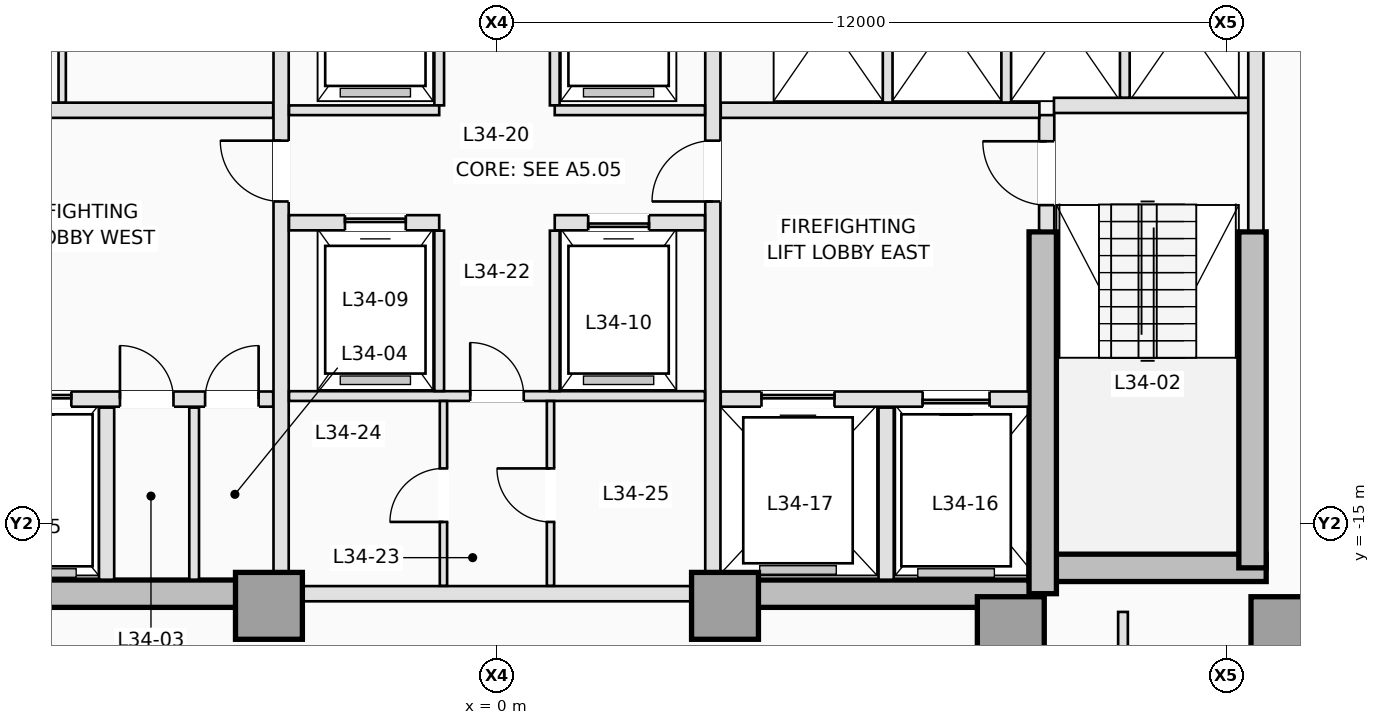
"""IFC4 building model, lengths in metres.
Left out: names, types, materials, properties, quantities, classifications, styles, units other than length and angle.
Written with IfcOpenShell. Run it as: python <this file> out.ifc"""

import sys

from ifc_helpers import new_model, si_unit, direction, frame, frame_2d, origin, origin_2d, place, context, subcontext, project, spatial, rectangle, extrude, element, fill, save


model = new_model("IFC4")
c1 = context("Model", 3, precision=1e-05, world=origin(), true_north=direction((0.0, 1.0)))
c2 = subcontext(c1, "Body", "Model", "MODEL_VIEW")
j1 = project(units=[si_unit("LENGTHUNIT", "METRE"), si_unit("PLANEANGLEUNIT", "RADIAN")], contexts=[c1])
p1 = place(None, origin())
s1 = spatial("IfcSite", under=j1, at=p1, CompositionType="ELEMENT")
p2 = place(p1, origin())
s2 = spatial("IfcBuilding", under=s1, at=p2, CompositionType="ELEMENT")
p3 = place(p2, frame((0.0, 0.0, 126.5)))
s3 = spatial("IfcBuildingStorey", under=s2, at=p3, CompositionType="ELEMENT", Elevation=126.5)
for number, where, z_axis, x_axis in (
    (1, (-8.975, -16.15, 0.0), (0.0, 0.0, 1.0), (1.0, 0.0, 0.0)),
    (2, (3.75, -16.15, 0.0), (0.0, 0.0, 1.0), (1.0, 0.0, 0.0)),
):
    element("IfcWall", number, at=place(p3, frame(where, z_axis=z_axis, x_axis=x_axis)), inside=s3, PredefinedType="SHEAR", context=c2, shape_type="SweptSolid", body=[
        extrude(rectangle(XDim=5.225, YDim=0.45, at=frame_2d((2.613, 0.0))), origin(), (0.0, 0.0, 1.0), 3.5),
    ])
p4 = place(p3, frame((8.75, -15.725, 0.0), z_axis=(0.0, 0.0, 1.0), x_axis=(1.0, 0.0, 0.0)))
e3 = element("IfcWall", 3, at=p4, inside=s3, PredefinedType="SHEAR", context=c2, shape_type="SweptSolid", body=[
    extrude(rectangle(XDim=3.9, YDim=0.45, at=frame_2d((1.95, 0.0))), origin(), (0.0, 0.0, 1.0), 3.5),
])
p5 = place(p3, frame((12.425, -15.725, 0.0), z_axis=(0.0, 0.0, 1.0), x_axis=(0.0, 1.0, 0.0)))
e4 = element("IfcWall", 4, at=p5, inside=s3, PredefinedType="SHEAR", context=c2, shape_type="SweptSolid", body=[
    extrude(rectangle(XDim=5.525, YDim=0.45, at=frame_2d((2.763, 0.0))), origin(), (0.0, 0.0, 1.0), 3.5),
])
p6 = place(p3, frame((8.975, -16.15, 0.0), z_axis=(0.0, 0.0, 1.0), x_axis=(0.0, 1.0, 0.0)))
e5 = element("IfcWall", 5, at=p6, inside=s3, PredefinedType="SHEAR", context=c2, shape_type="SweptSolid", body=[
    extrude(rectangle(XDim=5.95, YDim=0.45, at=frame_2d((2.975, 0.0))), origin(), (0.0, 0.0, 1.0), 3.5),
])
for number, where, z_axis, x_axis in (
    (6, (-3.75, -16.35, 0.0), (0.0, 0.0, 1.0), (1.0, 0.0, 0.0)),
    (7, (3.75, -16.35, 0.0), (0.0, 0.0, 1.0), (1.0, 0.0, 0.0)),
    (8, (8.45, -16.75, 0.0), (0.0, 0.0, 1.0), (1.0, 0.0, 0.0)),
    (9, (12.95, -16.75, 0.0), (0.0, 0.0, 1.0), (1.0, 0.0, 0.0)),
):
    element("IfcColumn", number, at=place(p3, frame(where, z_axis=z_axis, x_axis=x_axis)), inside=s3, PredefinedType="COLUMN", context=c2, shape_type="SweptSolid", body=[
        extrude(rectangle(XDim=1.1, YDim=1.1, at=origin_2d()), origin(), (0.0, 0.0, 1.0), 3.5),
    ])
p7 = place(p3, frame((9.04, -10.18, 0.0), z_axis=(0.0, 0.0, 1.0), x_axis=(0.0, 1.0, 0.0)))
e10 = element("IfcWall", 10, at=p7, inside=s3, PredefinedType="PARTITIONING", context=c2, shape_type="SweptSolid", body=[
    extrude(rectangle(XDim=1.9, YDim=0.25, at=frame_2d((0.95, 0.0))), origin(), (0.0, 0.0, 1.0), 3.25),
])
p8 = place(p7, frame((0.42, 0.0, 0.0)))
e11 = element("IfcOpeningElement", 11, at=p8, cuts=e10, PredefinedType="OPENING", context=c2, shape_type="SweptSolid", body=[
    extrude(rectangle(XDim=1.05, YDim=2.15, at=frame_2d((0.525, 1.075))), frame((0.0, 0.135, 0.0), z_axis=(0.0, -1.0, 0.0), x_axis=(1.0, 0.0, 0.0)), (0.0, 0.0, 1.0), 0.27),
])
p9 = place(p3, frame((9.16, -8.12, 0.0), z_axis=(0.0, 0.0, 1.0), x_axis=(1.0, 0.0, 0.0)))
e12 = element("IfcWall", 12, at=p9, inside=s3, PredefinedType="PARTITIONING", context=c2, shape_type="SweptSolid", body=[
    extrude(rectangle(XDim=3.22, YDim=0.25, at=frame_2d((1.61, 0.0))), origin(), (0.0, 0.0, 1.0), 3.25),
])
p10 = place(p3, frame((12.48, -10.18, 0.0), z_axis=(0.0, 0.0, 1.0), x_axis=(0.0, 1.0, 0.0)))
e13 = element("IfcWall", 13, at=p10, inside=s3, PredefinedType="PARTITIONING", context=c2, shape_type="SweptSolid", body=[
    extrude(rectangle(XDim=4.828, YDim=0.25, at=frame_2d((2.414, 0.0))), origin(), (0.0, 0.0, 1.0), 3.25),
])
p11 = place(p3, frame((-8.748, -12.95, 0.0), z_axis=(0.0, 0.0, 1.0), x_axis=(1.0, 0.0, 0.0)))
e14 = element("IfcWall", 14, at=p11, inside=s3, PredefinedType="PARTITIONING", context=c2, shape_type="SweptSolid", body=[
    extrude(rectangle(XDim=5.068, YDim=0.25, at=frame_2d((2.534, 0.0))), origin(), (0.0, 0.0, 1.0), 3.25),
])
p12 = place(p11, frame((0.648, 0.0, 0.0)))
e15 = element("IfcOpeningElement", 15, at=p12, cuts=e14, PredefinedType="OPENING", context=c2, shape_type="SweptSolid", body=[
    extrude(rectangle(XDim=1.1, YDim=2.15, at=frame_2d((0.55, 1.075))), frame((0.0, 0.135, 0.0), z_axis=(0.0, -1.0, 0.0), x_axis=(1.0, 0.0, 0.0)), (0.0, 0.0, 1.0), 0.27),
])
p13 = place(p11, frame((2.548, 0.0, 0.0)))
e16 = element("IfcOpeningElement", 16, at=p13, cuts=e14, PredefinedType="OPENING", context=c2, shape_type="SweptSolid", body=[
    extrude(rectangle(XDim=0.88, YDim=2.1, at=frame_2d((0.44, 1.05))), frame((0.0, 0.135, 0.0), z_axis=(0.0, -1.0, 0.0), x_axis=(1.0, 0.0, 0.0)), (0.0, 0.0, 1.0), 0.27),
])
p14 = place(p11, frame((3.948, 0.0, 0.0)))
e17 = element("IfcOpeningElement", 17, at=p14, cuts=e14, PredefinedType="OPENING", context=c2, shape_type="SweptSolid", body=[
    extrude(rectangle(XDim=0.88, YDim=2.1, at=frame_2d((0.44, 1.05))), frame((0.0, 0.135, 0.0), z_axis=(0.0, -1.0, 0.0), x_axis=(1.0, 0.0, 0.0)), (0.0, 0.0, 1.0), 0.27),
])
p15 = place(p3, frame((3.68, -12.95, 0.0), z_axis=(0.0, 0.0, 1.0), x_axis=(1.0, 0.0, 0.0)))
e18 = element("IfcWall", 18, at=p15, inside=s3, PredefinedType="PARTITIONING", context=c2, shape_type="SweptSolid", body=[
    extrude(rectangle(XDim=5.068, YDim=0.25, at=frame_2d((2.534, 0.0))), origin(), (0.0, 0.0, 1.0), 3.25),
])
p16 = place(p15, frame((3.32, 0.0, 0.0)))
e19 = element("IfcOpeningElement", 19, at=p16, cuts=e18, PredefinedType="OPENING", context=c2, shape_type="SweptSolid", body=[
    extrude(rectangle(XDim=1.1, YDim=2.15, at=frame_2d((0.55, 1.075))), frame((0.0, 0.135, 0.0), z_axis=(0.0, -1.0, 0.0), x_axis=(1.0, 0.0, 0.0)), (0.0, 0.0, 1.0), 0.27),
])
p17 = place(p15, frame((0.67, 0.0, 0.0)))
e20 = element("IfcOpeningElement", 20, at=p17, cuts=e18, PredefinedType="OPENING", context=c2, shape_type="SweptSolid", body=[
    extrude(rectangle(XDim=1.2, YDim=2.15, at=frame_2d((0.6, 1.075))), frame((0.0, 0.135, 0.0), z_axis=(0.0, -1.0, 0.0), x_axis=(1.0, 0.0, 0.0)), (0.0, 0.0, 1.0), 0.27),
])
p18 = place(p3, frame((-6.42, -15.92, 0.0), z_axis=(0.0, 0.0, 1.0), x_axis=(0.0, 1.0, 0.0)))
e21 = element("IfcWall", 21, at=p18, inside=s3, PredefinedType="PARTITIONING", context=c2, shape_type="SweptSolid", body=[
    extrude(rectangle(XDim=2.83, YDim=0.25, at=frame_2d((1.415, 0.0))), origin(), (0.0, 0.0, 1.0), 3.25),
])
p19 = place(p3, frame((-4.98, -15.92, 0.0), z_axis=(0.0, 0.0, 1.0), x_axis=(0.0, 1.0, 0.0)))
e22 = element("IfcWall", 22, at=p19, inside=s3, PredefinedType="PARTITIONING", context=c2, shape_type="SweptSolid", body=[
    extrude(rectangle(XDim=2.83, YDim=0.16, at=frame_2d((1.415, 0.0))), origin(), (0.0, 0.0, 1.0), 3.25),
])
p20 = place(p3, frame((6.4, -15.92, 0.0), z_axis=(0.0, 0.0, 1.0), x_axis=(0.0, 1.0, 0.0)))
e23 = element("IfcWall", 23, at=p20, inside=s3, PredefinedType="PARTITIONING", context=c2, shape_type="SweptSolid", body=[
    extrude(rectangle(XDim=2.83, YDim=0.25, at=frame_2d((1.415, 0.0))), origin(), (0.0, 0.0, 1.0), 3.25),
])
for number, where, z_axis, x_axis in (
    (24, (-8.92, -8.2, 0.0), (0.0, 0.0, 1.0), (1.0, 0.0, 0.0)),
    (25, (3.68, -8.2, 0.0), (0.0, 0.0, 1.0), (1.0, 0.0, 0.0)),
):
    element("IfcWall", number, at=place(p3, frame(where, z_axis=z_axis, x_axis=x_axis)), inside=s3, PredefinedType="PARTITIONING", context=c2, shape_type="SweptSolid", body=[
        extrude(rectangle(XDim=5.24, YDim=0.25, at=frame_2d((2.62, 0.0))), origin(), (0.0, 0.0, 1.0), 3.25),
    ])
p21 = place(p3, frame((-3.55, -15.798, 0.0), z_axis=(0.0, 0.0, 1.0), x_axis=(0.0, 1.0, 0.0)))
e26 = element("IfcWall", 26, at=p21, inside=s3, PredefinedType="PARTITIONING", context=c2, shape_type="SweptSolid", body=[
    extrude(rectangle(XDim=10.446, YDim=0.25, at=frame_2d((5.223, 0.0))), origin(), (0.0, 0.0, 1.0), 3.25),
])
p22 = place(p21, frame((6.098, 0.0, 0.0)))
e27 = element("IfcOpeningElement", 27, at=p22, cuts=e26, PredefinedType="OPENING", context=c2, shape_type="SweptSolid", body=[
    extrude(rectangle(XDim=1.0, YDim=2.15, at=frame_2d((0.5, 1.075))), frame((0.0, 0.135, 0.0), z_axis=(0.0, -1.0, 0.0), x_axis=(1.0, 0.0, 0.0)), (0.0, 0.0, 1.0), 0.27),
])
p23 = place(p3, frame((3.55, -15.798, 0.0), z_axis=(0.0, 0.0, 1.0), x_axis=(0.0, 1.0, 0.0)))
e28 = element("IfcWall", 28, at=p23, inside=s3, PredefinedType="PARTITIONING", context=c2, shape_type="SweptSolid", body=[
    extrude(rectangle(XDim=10.446, YDim=0.25, at=frame_2d((5.223, 0.0))), origin(), (0.0, 0.0, 1.0), 3.25),
])
p24 = place(p23, frame((6.098, 0.0, 0.0)))
e29 = element("IfcOpeningElement", 29, at=p24, cuts=e28, PredefinedType="OPENING", context=c2, shape_type="SweptSolid", body=[
    extrude(rectangle(XDim=1.0, YDim=2.15, at=frame_2d((0.5, 1.075))), frame((0.0, 0.135, 0.0), z_axis=(0.0, -1.0, 0.0), x_axis=(1.0, 0.0, 0.0)), (0.0, 0.0, 1.0), 0.27),
])
p25 = place(p3, frame((-7.15, -8.073, 0.0), z_axis=(0.0, 0.0, 1.0), x_axis=(0.0, 1.0, 0.0)))
e30 = element("IfcWall", 30, at=p25, inside=s3, PredefinedType="PARTITIONING", context=c2, shape_type="SweptSolid", body=[
    extrude(rectangle(XDim=2.733, YDim=0.12, at=frame_2d((1.366, 0.0))), origin(), (0.0, 0.0, 1.0), 3.25),
])
for number, where, z_axis, x_axis in (
    (31, (6.425, -8.073, 0.0), (0.0, 0.0, 1.0), (0.0, 1.0, 0.0)),
    (32, (8.375, -8.073, 0.0), (0.0, 0.0, 1.0), (0.0, 1.0, 0.0)),
):
    element("IfcWall", number, at=place(p3, frame(where, z_axis=z_axis, x_axis=x_axis)), inside=s3, PredefinedType="PARTITIONING", context=c2, shape_type="SweptSolid", body=[
        extrude(rectangle(XDim=2.733, YDim=0.16, at=frame_2d((1.366, 0.0))), origin(), (0.0, 0.0, 1.0), 3.25),
    ])
p26 = place(p3, frame((10.325, -7.993, 0.0), z_axis=(0.0, 0.0, 1.0), x_axis=(0.0, 1.0, 0.0)))
e33 = element("IfcWall", 33, at=p26, inside=s3, PredefinedType="PARTITIONING", context=c2, shape_type="SweptSolid", body=[
    extrude(rectangle(XDim=2.653, YDim=0.16, at=frame_2d((1.326, 0.0))), origin(), (0.0, 0.0, 1.0), 3.25),
])
p27 = place(p3, frame((-3.198, -16.15, 0.0), z_axis=(0.0, 0.0, 1.0), x_axis=(1.0, 0.0, 0.0)))
e34 = element("IfcWall", 34, at=p27, inside=s3, PredefinedType="PARTITIONING", context=c2, shape_type="SweptSolid", body=[
    extrude(rectangle(XDim=6.396, YDim=0.25, at=frame_2d((3.198, 0.0))), origin(), (0.0, 0.0, 1.0), 2.3),
])
for number, where, z_axis, x_axis in (
    (35, (-0.95, -8.12, 0.0), (0.0, 0.0, 1.0), (0.0, 1.0, 0.0)),
    (36, (0.95, -8.12, 0.0), (0.0, 0.0, 1.0), (0.0, 1.0, 0.0)),
):
    element("IfcWall", number, at=place(p3, frame(where, z_axis=z_axis, x_axis=x_axis)), inside=s3, PredefinedType="PARTITIONING", context=c2, shape_type="SweptSolid", body=[
        extrude(rectangle(XDim=2.78, YDim=0.16, at=frame_2d((1.39, 0.0))), origin(), (0.0, 0.0, 1.0), 3.25),
    ])
for number, where, z_axis, x_axis in (
    (37, (-3.42, -8.2, 0.0), (0.0, 0.0, 1.0), (1.0, 0.0, 0.0)),
    (38, (0.95, -8.2, 0.0), (0.0, 0.0, 1.0), (1.0, 0.0, 0.0)),
):
    element("IfcWall", number, at=place(p3, frame(where, z_axis=z_axis, x_axis=x_axis)), inside=s3, PredefinedType="PARTITIONING", context=c2, shape_type="SweptSolid", body=[
        extrude(rectangle(XDim=2.47, YDim=0.16, at=frame_2d((1.235, 0.0))), origin(), (0.0, 0.0, 1.0), 3.25),
    ])
p28 = place(p3, frame((-3.42, -10.05, 0.0), z_axis=(0.0, 0.0, 1.0), x_axis=(1.0, 0.0, 0.0)))
e39 = element("IfcWall", 39, at=p28, inside=s3, PredefinedType="PARTITIONING", context=c2, shape_type="SweptSolid", body=[
    extrude(rectangle(XDim=2.47, YDim=0.25, at=frame_2d((1.235, 0.0))), origin(), (0.0, 0.0, 1.0), 3.25),
])
p29 = place(p28, frame((0.92, 0.0, 0.0)))
e40 = element("IfcOpeningElement", 40, at=p29, cuts=e39, PredefinedType="OPENING", context=c2, shape_type="SweptSolid", body=[
    extrude(rectangle(XDim=1.0, YDim=2.15, at=frame_2d((0.5, 1.075))), frame((0.0, 0.135, 0.0), z_axis=(0.0, -1.0, 0.0), x_axis=(1.0, 0.0, 0.0)), (0.0, 0.0, 1.0), 0.27),
])
p30 = place(p3, frame((0.95, -10.05, 0.0), z_axis=(0.0, 0.0, 1.0), x_axis=(1.0, 0.0, 0.0)))
e41 = element("IfcWall", 41, at=p30, inside=s3, PredefinedType="PARTITIONING", context=c2, shape_type="SweptSolid", body=[
    extrude(rectangle(XDim=2.47, YDim=0.25, at=frame_2d((1.235, 0.0))), origin(), (0.0, 0.0, 1.0), 3.25),
])
p31 = place(p30, frame((0.55, 0.0, 0.0)))
e42 = element("IfcOpeningElement", 42, at=p31, cuts=e41, PredefinedType="OPENING", context=c2, shape_type="SweptSolid", body=[
    extrude(rectangle(XDim=1.0, YDim=2.15, at=frame_2d((0.5, 1.075))), frame((0.0, 0.135, 0.0), z_axis=(0.0, -1.0, 0.0), x_axis=(1.0, 0.0, 0.0)), (0.0, 0.0, 1.0), 0.27),
])
p32 = place(p3, frame((-3.42, -12.9, 0.0), z_axis=(0.0, 0.0, 1.0), x_axis=(1.0, 0.0, 0.0)))
e43 = element("IfcWall", 43, at=p32, inside=s3, PredefinedType="PARTITIONING", context=c2, shape_type="SweptSolid", body=[
    extrude(rectangle(XDim=6.84, YDim=0.16, at=frame_2d((3.42, 0.0))), origin(), (0.0, 0.0, 1.0), 3.25),
])
p33 = place(p32, frame((2.98, 0.0, 0.0)))
e44 = element("IfcOpeningElement", 44, at=p33, cuts=e43, PredefinedType="OPENING", context=c2, shape_type="SweptSolid", body=[
    extrude(rectangle(XDim=0.88, YDim=2.12, at=frame_2d((0.44, 1.06))), frame((0.0, 0.09, 0.0), z_axis=(0.0, -1.0, 0.0), x_axis=(1.0, 0.0, 0.0)), (0.0, 0.0, 1.0), 0.18),
])
for number, where, z_axis, x_axis in (
    (45, (-0.95, -12.818, 0.0), (0.0, 0.0, 1.0), (0.0, 1.0, 0.0)),
    (46, (0.95, -12.818, 0.0), (0.0, 0.0, 1.0), (0.0, 1.0, 0.0)),
):
    element("IfcWall", number, at=place(p3, frame(where, z_axis=z_axis, x_axis=x_axis)), inside=s3, PredefinedType="PARTITIONING", context=c2, shape_type="SweptSolid", body=[
        extrude(rectangle(XDim=2.638, YDim=0.16, at=frame_2d((1.319, 0.0))), origin(), (0.0, 0.0, 1.0), 3.25),
    ])
p34 = place(p3, frame((-0.88, -16.02, 0.0), z_axis=(0.0, 0.0, 1.0), x_axis=(0.0, 1.0, 0.0)))
e47 = element("IfcWall", 47, at=p34, inside=s3, PredefinedType="PARTITIONING", context=c2, shape_type="SweptSolid", body=[
    extrude(rectangle(XDim=3.038, YDim=0.12, at=frame_2d((1.519, 0.0))), origin(), (0.0, 0.0, 1.0), 3.25),
])
p35 = place(p34, frame((1.05, 0.0, 0.0)))
e48 = element("IfcOpeningElement", 48, at=p35, cuts=e47, PredefinedType="OPENING", context=c2, shape_type="SweptSolid", body=[
    extrude(rectangle(XDim=0.88, YDim=2.12, at=frame_2d((0.44, 1.06))), frame((0.0, 0.07, 0.0), z_axis=(0.0, -1.0, 0.0), x_axis=(1.0, 0.0, 0.0)), (0.0, 0.0, 1.0), 0.14),
])
p36 = place(p3, frame((0.88, -16.02, 0.0), z_axis=(0.0, 0.0, 1.0), x_axis=(0.0, 1.0, 0.0)))
e49 = element("IfcWall", 49, at=p36, inside=s3, PredefinedType="PARTITIONING", context=c2, shape_type="SweptSolid", body=[
    extrude(rectangle(XDim=3.038, YDim=0.12, at=frame_2d((1.519, 0.0))), origin(), (0.0, 0.0, 1.0), 3.25),
])
p37 = place(p36, frame((1.05, 0.0, 0.0)))
e50 = element("IfcOpeningElement", 50, at=p37, cuts=e49, PredefinedType="OPENING", context=c2, shape_type="SweptSolid", body=[
    extrude(rectangle(XDim=0.88, YDim=2.12, at=frame_2d((0.44, 1.06))), frame((0.0, 0.07, 0.0), z_axis=(0.0, -1.0, 0.0), x_axis=(1.0, 0.0, 0.0)), (0.0, 0.0, 1.0), 0.14),
])
p38 = place(p3, frame((10.295, -19.698, 0.0), z_axis=(0.0, 0.0, 1.0), x_axis=(0.0, 1.0, 0.0)))
e51 = element("IfcWall", 51, at=p38, inside=s3, PredefinedType="PARTITIONING", context=c2, shape_type="SweptSolid", body=[
    extrude(rectangle(XDim=3.248, YDim=0.16, at=frame_2d((1.624, 0.0))), origin(), (0.0, 0.0, 1.0), 3.25),
])
p39 = place(p12, origin())
e52 = element("IfcDoor", 52, at=p39, inside=s3, OperationType="SLIDING_TO_LEFT", PredefinedType="DOOR", context=c2, shape_type="SweptSolid", body=[
    extrude(rectangle(XDim=1.1, YDim=2.15, at=frame_2d((0.55, 1.075))), frame((0.0, 0.025, 0.0), z_axis=(0.0, -1.0, 0.0), x_axis=(1.0, 0.0, 0.0)), (0.0, 0.0, 1.0), 0.05),
])
fill(e15, e52)
p40 = place(p16, origin())
e53 = element("IfcDoor", 53, at=p40, inside=s3, OperationType="SLIDING_TO_RIGHT", PredefinedType="DOOR", context=c2, shape_type="SweptSolid", body=[
    extrude(rectangle(XDim=1.1, YDim=2.15, at=frame_2d((0.55, 1.075))), frame((0.0, 0.025, 0.0), z_axis=(0.0, -1.0, 0.0), x_axis=(1.0, 0.0, 0.0)), (0.0, 0.0, 1.0), 0.05),
])
fill(e19, e53)
p41 = place(p17, origin())
e54 = element("IfcDoor", 54, at=p41, inside=s3, OperationType="SLIDING_TO_LEFT", PredefinedType="DOOR", context=c2, shape_type="SweptSolid", body=[
    extrude(rectangle(XDim=1.2, YDim=2.15, at=frame_2d((0.6, 1.075))), frame((0.0, 0.025, 0.0), z_axis=(0.0, -1.0, 0.0), x_axis=(1.0, 0.0, 0.0)), (0.0, 0.0, 1.0), 0.05),
])
fill(e20, e54)
p42 = place(p29, origin())
e55 = element("IfcDoor", 55, at=p42, inside=s3, OperationType="SLIDING_TO_LEFT", PredefinedType="DOOR", context=c2, shape_type="SweptSolid", body=[
    extrude(rectangle(XDim=1.0, YDim=2.15, at=frame_2d((0.5, 1.075))), frame((0.0, 0.025, 0.0), z_axis=(0.0, -1.0, 0.0), x_axis=(1.0, 0.0, 0.0)), (0.0, 0.0, 1.0), 0.05),
])
fill(e40, e55)
p43 = place(p31, origin())
e56 = element("IfcDoor", 56, at=p43, inside=s3, OperationType="SLIDING_TO_RIGHT", PredefinedType="DOOR", context=c2, shape_type="SweptSolid", body=[
    extrude(rectangle(XDim=1.0, YDim=2.15, at=frame_2d((0.5, 1.075))), frame((0.0, 0.025, 0.0), z_axis=(0.0, -1.0, 0.0), x_axis=(1.0, 0.0, 0.0)), (0.0, 0.0, 1.0), 0.05),
])
fill(e42, e56)
p44 = place(p8, origin())
e57 = element("IfcDoor", 57, at=p44, inside=s3, OperationType="SINGLE_SWING_RIGHT", PredefinedType="DOOR", context=c2, shape_type="SweptSolid", body=[
    extrude(rectangle(XDim=1.05, YDim=2.15, at=frame_2d((0.525, 1.075))), frame((0.0, 0.025, 0.0), z_axis=(0.0, -1.0, 0.0), x_axis=(1.0, 0.0, 0.0)), (0.0, 0.0, 1.0), 0.05),
])
fill(e11, e57)
p45 = place(p13, origin())
e58 = element("IfcDoor", 58, at=p45, inside=s3, OperationType="SINGLE_SWING_LEFT", PredefinedType="TRAPDOOR", context=c2, shape_type="SweptSolid", body=[
    extrude(rectangle(XDim=0.88, YDim=2.1, at=frame_2d((0.44, 1.05))), frame((0.0, 0.025, 0.0), z_axis=(0.0, -1.0, 0.0), x_axis=(1.0, 0.0, 0.0)), (0.0, 0.0, 1.0), 0.05),
])
fill(e16, e58)
p46 = place(p14, origin())
e59 = element("IfcDoor", 59, at=p46, inside=s3, OperationType="SINGLE_SWING_RIGHT", PredefinedType="TRAPDOOR", context=c2, shape_type="SweptSolid", body=[
    extrude(rectangle(XDim=0.88, YDim=2.1, at=frame_2d((0.44, 1.05))), frame((0.0, 0.025, 0.0), z_axis=(0.0, -1.0, 0.0), x_axis=(1.0, 0.0, 0.0)), (0.0, 0.0, 1.0), 0.05),
])
fill(e17, e59)
p47 = place(p22, origin())
e60 = element("IfcDoor", 60, at=p47, inside=s3, OperationType="SINGLE_SWING_RIGHT", PredefinedType="DOOR", context=c2, shape_type="SweptSolid", body=[
    extrude(rectangle(XDim=1.0, YDim=2.15, at=frame_2d((0.5, 1.075))), frame((0.0, 0.025, 0.0), z_axis=(0.0, -1.0, 0.0), x_axis=(1.0, 0.0, 0.0)), (0.0, 0.0, 1.0), 0.05),
])
fill(e27, e60)
p48 = place(p24, origin())
e61 = element("IfcDoor", 61, at=p48, inside=s3, OperationType="SINGLE_SWING_LEFT", PredefinedType="DOOR", context=c2, shape_type="SweptSolid", body=[
    extrude(rectangle(XDim=1.0, YDim=2.15, at=frame_2d((0.5, 1.075))), frame((0.0, 0.025, 0.0), z_axis=(0.0, -1.0, 0.0), x_axis=(1.0, 0.0, 0.0)), (0.0, 0.0, 1.0), 0.05),
])
fill(e29, e61)
p49 = place(p33, origin())
e62 = element("IfcDoor", 62, at=p49, inside=s3, OperationType="SINGLE_SWING_LEFT", PredefinedType="DOOR", context=c2, shape_type="SweptSolid", body=[
    extrude(rectangle(XDim=0.88, YDim=2.12, at=frame_2d((0.44, 1.06))), frame((0.0, 0.025, 0.0), z_axis=(0.0, -1.0, 0.0), x_axis=(1.0, 0.0, 0.0)), (0.0, 0.0, 1.0), 0.05),
])
fill(e44, e62)
p50 = place(p35, origin())
e63 = element("IfcDoor", 63, at=p50, inside=s3, OperationType="SINGLE_SWING_LEFT", PredefinedType="DOOR", context=c2, shape_type="SweptSolid", body=[
    extrude(rectangle(XDim=0.88, YDim=2.12, at=frame_2d((0.44, 1.06))), frame((0.0, 0.025, 0.0), z_axis=(0.0, -1.0, 0.0), x_axis=(1.0, 0.0, 0.0)), (0.0, 0.0, 1.0), 0.05),
])
fill(e48, e63)
p51 = place(p37, origin())
e64 = element("IfcDoor", 64, at=p51, inside=s3, OperationType="SINGLE_SWING_RIGHT", PredefinedType="DOOR", context=c2, shape_type="SweptSolid", body=[
    extrude(rectangle(XDim=0.88, YDim=2.12, at=frame_2d((0.44, 1.06))), frame((0.0, 0.025, 0.0), z_axis=(0.0, -1.0, 0.0), x_axis=(1.0, 0.0, 0.0)), (0.0, 0.0, 1.0), 0.05),
])
fill(e50, e64)
save(model, sys.argv[1])
